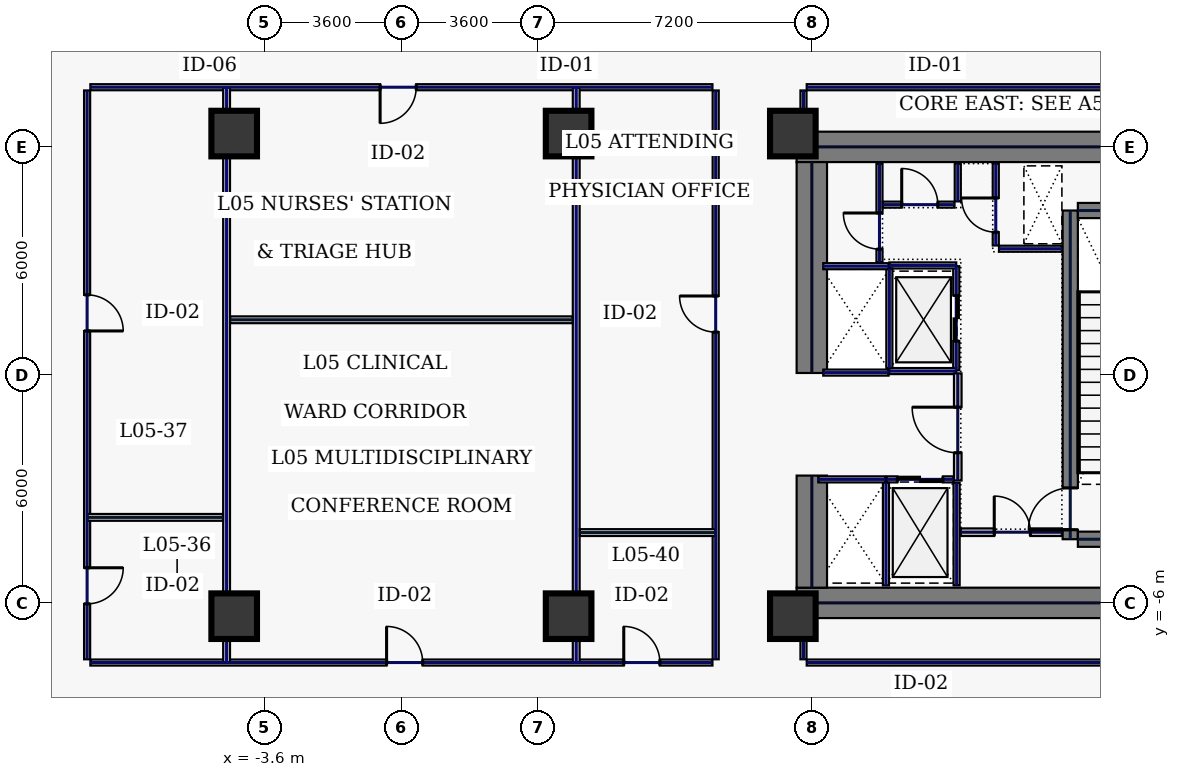
"""IFC4 building model, lengths in metres.
Left out: names, types, materials, properties, quantities, classifications, styles, units other than length and angle.
Written with IfcOpenShell. Run it as: python <this file> out.ifc"""

import sys

from ifc_helpers import new_model, si_unit, direction, frame, frame_2d, origin, origin_2d, place, context, subcontext, project, spatial, rectangle, hollow_rectangle, extrude, element, fill, save


model = new_model("IFC4")
c1 = context("Model", 3, precision=1e-05, world=origin(), true_north=direction((0.0, 1.0)))
c2 = subcontext(c1, "Body", "Model", "MODEL_VIEW")
j1 = project(units=[si_unit("LENGTHUNIT", "METRE"), si_unit("PLANEANGLEUNIT", "RADIAN")], contexts=[c1])
p1 = place(None, origin())
s1 = spatial("IfcSite", under=j1, at=p1, CompositionType="ELEMENT")
p2 = place(p1, origin())
s2 = spatial("IfcBuilding", under=s1, at=p2, CompositionType="ELEMENT")
p3 = place(p2, frame((0.0, 0.0, 28.4)))
s3 = spatial("IfcBuildingStorey", under=s2, at=p3, CompositionType="ELEMENT", Elevation=28.4)
for number, where, z_axis, x_axis in (
    (1, (10.4, 6.0, 0.0), (0.0, 0.0, 1.0), (1.0, 0.0, 0.0)),
    (2, (10.4, -6.0, 0.0), (0.0, 0.0, 1.0), (1.0, 0.0, 0.0)),
):
    element("IfcWall", number, at=place(p3, frame(where, z_axis=z_axis, x_axis=x_axis)), inside=s3, PredefinedType="SHEAR", context=c2, shape_type="SweptSolid", body=[
        extrude(rectangle(XDim=11.6, YDim=0.8, at=frame_2d((5.8, 0.0))), origin(), (0.0, 0.0, 1.0), 4.68),
    ])
p4 = place(p3, frame((10.8, -5.6, 0.0), z_axis=(0.0, 0.0, 1.0), x_axis=(0.0, 1.0, 0.0)))
e3 = element("IfcWall", 3, at=p4, inside=s3, PredefinedType="SHEAR", context=c2, shape_type="SweptSolid", body=[
    extrude(rectangle(XDim=2.95, YDim=0.8, at=frame_2d((1.475, 0.0))), origin(), (0.0, 0.0, 1.0), 4.68),
])
p5 = place(p3, frame((10.8, 0.05, 0.0), z_axis=(0.0, 0.0, 1.0), x_axis=(0.0, 1.0, 0.0)))
e4 = element("IfcWall", 4, at=p5, inside=s3, PredefinedType="SHEAR", context=c2, shape_type="SweptSolid", body=[
    extrude(rectangle(XDim=5.55, YDim=0.8, at=frame_2d((2.775, 0.0))), origin(), (0.0, 0.0, 1.0), 4.68),
])
p6 = place(p3, frame((17.6, -4.325, 0.0), z_axis=(0.0, 0.0, 1.0), x_axis=(0.0, 1.0, 0.0)))
e5 = element("IfcWall", 5, at=p6, inside=s3, PredefinedType="SHEAR", context=c2, shape_type="SweptSolid", body=[
    extrude(rectangle(XDim=8.65, YDim=0.4, at=frame_2d((4.325, 0.0))), origin(), (0.0, 0.0, 1.0), 4.68),
])
p7 = place(p6, frame((0.25, 0.0, 0.0)))
e6 = element("IfcOpeningElement", 6, at=p7, cuts=e5, PredefinedType="OPENING", context=c2, shape_type="SweptSolid", body=[
    extrude(rectangle(XDim=1.1, YDim=2.2, at=frame_2d((0.55, 1.1))), frame((0.0, 0.21, 0.0), z_axis=(0.0, -1.0, 0.0), x_axis=(1.0, 0.0, 0.0)), (0.0, 0.0, 1.0), 0.42),
])
for number, where, z_axis, x_axis in (
    (7, (17.8, -4.325, 0.0), (0.0, 0.0, 1.0), (1.0, 0.0, 0.0)),
    (8, (17.8, 4.325, 0.0), (0.0, 0.0, 1.0), (1.0, 0.0, 0.0)),
):
    element("IfcWall", number, at=place(p3, frame(where, z_axis=z_axis, x_axis=x_axis)), inside=s3, PredefinedType="SHEAR", context=c2, shape_type="SweptSolid", body=[
        extrude(rectangle(XDim=3.4, YDim=0.4, at=frame_2d((1.7, 0.0))), origin(), (0.0, 0.0, 1.0), 4.68),
    ])
for number, where, z_axis, x_axis in (
    (9, (10.3, -6.35, 0.0), (0.0, 0.0, 1.0), (1.0, 0.0, 0.0)),
    (10, (10.3, 6.35, 0.0), (0.0, 0.0, 1.0), (1.0, 0.0, 0.0)),
    (11, (-4.4, -6.35, 0.0), (0.0, 0.0, 1.0), (1.0, 0.0, 0.0)),
    (12, (4.4, -6.35, 0.0), (0.0, 0.0, 1.0), (1.0, 0.0, 0.0)),
    (13, (-4.4, 6.35, 0.0), (0.0, 0.0, 1.0), (1.0, 0.0, 0.0)),
    (14, (4.4, 6.35, 0.0), (0.0, 0.0, 1.0), (1.0, 0.0, 0.0)),
):
    element("IfcColumn", number, at=place(p3, frame(where, z_axis=z_axis, x_axis=x_axis)), inside=s3, PredefinedType="COLUMN", context=c2, shape_type="SweptSolid", body=[
        extrude(hollow_rectangle(XDim=1.2, YDim=1.2, WallThickness=0.05, at=origin_2d()), origin(), (0.0, 0.0, 1.0), 4.68),
    ])
p8 = place(p3, frame((14.6, 0.12, 0.0), z_axis=(0.0, 0.0, 1.0), x_axis=(0.0, 1.0, 0.0)))
e15 = element("IfcWall", 15, at=p8, inside=s3, PredefinedType="PARTITIONING", context=c2, shape_type="SweptSolid", body=[
    extrude(rectangle(XDim=2.74, YDim=0.16, at=frame_2d((1.37, 0.0))), origin(), (0.0, 0.0, 1.0), 4.68),
])
p9 = place(p8, frame((0.77, 0.0, 0.0)))
e16 = element("IfcOpeningElement", 16, at=p9, cuts=e15, PredefinedType="OPENING", context=c2, shape_type="SweptSolid", body=[
    extrude(rectangle(XDim=1.2, YDim=2.2, at=frame_2d((0.6, 1.1))), frame((0.0, 0.09, 0.0), z_axis=(0.0, -1.0, 0.0), x_axis=(1.0, 0.0, 0.0)), (0.0, 0.0, 1.0), 0.18),
])
for number, where, z_axis, x_axis in (
    (17, (12.84, 0.1, 0.0), (0.0, 0.0, 1.0), (1.0, 0.0, 0.0)),
    (18, (12.84, 2.88, 0.0), (0.0, 0.0, 1.0), (1.0, 0.0, 0.0)),
):
    element("IfcWall", number, at=place(p3, frame(where, z_axis=z_axis, x_axis=x_axis)), inside=s3, PredefinedType="PARTITIONING", context=c2, shape_type="SweptSolid", body=[
        extrude(rectangle(XDim=1.76, YDim=0.16, at=frame_2d((0.88, 0.0))), origin(), (0.0, 0.0, 1.0), 4.68),
    ])
p10 = place(p3, frame((12.84, 0.18, 0.0), z_axis=(0.0, 0.0, 1.0), x_axis=(0.0, 1.0, 0.0)))
e19 = element("IfcWall", 19, at=p10, inside=s3, PredefinedType="PARTITIONING", context=c2, shape_type="SweptSolid", body=[
    extrude(rectangle(XDim=2.62, YDim=0.16, at=frame_2d((1.31, 0.0))), origin(), (0.0, 0.0, 1.0), 4.68),
])
p11 = place(p3, frame((12.77, -2.75, 0.0), z_axis=(0.0, 0.0, 1.0), x_axis=(1.0, 0.0, 0.0)))
e20 = element("IfcWall", 20, at=p11, inside=s3, PredefinedType="PARTITIONING", context=c2, shape_type="SweptSolid", body=[
    extrude(rectangle(XDim=1.76, YDim=0.16, at=frame_2d((0.88, 0.0))), origin(), (0.0, 0.0, 1.0), 4.68),
])
p12 = place(p11, frame((0.28, 0.0, 0.0)))
e21 = element("IfcOpeningElement", 21, at=p12, cuts=e20, PredefinedType="OPENING", context=c2, shape_type="SweptSolid", body=[
    extrude(rectangle(XDim=1.2, YDim=2.2, at=frame_2d((0.6, 1.1))), frame((0.0, 0.09, 0.0), z_axis=(0.0, -1.0, 0.0), x_axis=(1.0, 0.0, 0.0)), (0.0, 0.0, 1.0), 0.18),
])
for number, where, z_axis, x_axis in (
    (22, (12.75, -5.54, 0.0), (0.0, 0.0, 1.0), (0.0, 1.0, 0.0)),
    (23, (14.61, -5.54, 0.0), (0.0, 0.0, 1.0), (0.0, 1.0, 0.0)),
):
    element("IfcWall", number, at=place(p3, frame(where, z_axis=z_axis, x_axis=x_axis)), inside=s3, PredefinedType="PARTITIONING", context=c2, shape_type="SweptSolid", body=[
        extrude(rectangle(XDim=2.7, YDim=0.16, at=frame_2d((1.35, 0.0))), origin(), (0.0, 0.0, 1.0), 4.68),
    ])
p13 = place(p3, frame((10.97, -2.75, 0.0), z_axis=(0.0, 0.0, 1.0), x_axis=(1.0, 0.0, 0.0)))
e24 = element("IfcWall", 24, at=p13, inside=s3, PredefinedType="PARTITIONING", context=c2, shape_type="SweptSolid", body=[
    extrude(rectangle(XDim=1.76, YDim=0.16, at=frame_2d((0.88, 0.0))), origin(), (0.0, 0.0, 1.0), 4.68),
])
for number, where, z_axis, x_axis in (
    (25, (11.1, 0.06, 0.0), (0.0, 0.0, 1.0), (1.0, 0.0, 0.0)),
    (26, (11.1, 2.86, 0.0), (0.0, 0.0, 1.0), (1.0, 0.0, 0.0)),
):
    element("IfcWall", number, at=place(p3, frame(where, z_axis=z_axis, x_axis=x_axis)), inside=s3, PredefinedType="PARTITIONING", context=c2, shape_type="SweptSolid", body=[
        extrude(rectangle(XDim=1.72, YDim=0.16, at=frame_2d((0.86, 0.0))), origin(), (0.0, 0.0, 1.0), 4.68),
    ])
p14 = place(p3, frame((15.64, 3.405, 0.0), z_axis=(0.0, 0.0, 1.0), x_axis=(0.0, 1.0, 0.0)))
e27 = element("IfcWall", 27, at=p14, inside=s3, PredefinedType="PARTITIONING", context=c2, shape_type="SweptSolid", body=[
    extrude(rectangle(XDim=2.155, YDim=0.16, at=frame_2d((1.078, 0.0))), origin(), (0.0, 0.0, 1.0), 4.68),
])
p15 = place(p14, frame((0.35, 0.0, 0.0)))
e28 = element("IfcOpeningElement", 28, at=p15, cuts=e27, PredefinedType="OPENING", context=c2, shape_type="SweptSolid", body=[
    extrude(rectangle(XDim=0.9, YDim=2.2, at=frame_2d((0.45, 1.1))), frame((0.0, 0.09, 0.0), z_axis=(0.0, -1.0, 0.0), x_axis=(1.0, 0.0, 0.0)), (0.0, 0.0, 1.0), 0.18),
])
p16 = place(p3, frame((15.725, 3.32, 0.0), z_axis=(0.0, 0.0, 1.0), x_axis=(1.0, 0.0, 0.0)))
e29 = element("IfcWall", 29, at=p16, inside=s3, PredefinedType="PARTITIONING", context=c2, shape_type="SweptSolid", body=[
    extrude(rectangle(XDim=1.655, YDim=0.16, at=frame_2d((0.827, 0.0))), origin(), (0.0, 0.0, 1.0), 4.68),
])
p17 = place(p3, frame((14.72, -4.14, 0.0), z_axis=(0.0, 0.0, 1.0), x_axis=(1.0, 0.0, 0.0)))
e30 = element("IfcWall", 30, at=p17, inside=s3, PredefinedType="SOLIDWALL", context=c2, shape_type="SweptSolid", body=[
    extrude(rectangle(XDim=2.66, YDim=0.2, at=frame_2d((1.33, 0.0))), origin(), (0.0, 0.0, 1.0), 4.68),
])
p18 = place(p17, frame((0.88, 0.0, 0.0)))
e31 = element("IfcOpeningElement", 31, at=p18, cuts=e30, PredefinedType="OPENING", context=c2, shape_type="SweptSolid", body=[
    extrude(rectangle(XDim=0.95, YDim=2.2, at=frame_2d((0.475, 1.1))), frame((0.0, 0.11, 0.0), z_axis=(0.0, -1.0, 0.0), x_axis=(1.0, 0.0, 0.0)), (0.0, 0.0, 1.0), 0.22),
])
p19 = place(p3, frame((12.58, 2.96, 0.0), z_axis=(0.0, 0.0, 1.0), x_axis=(0.0, 1.0, 0.0)))
e32 = element("IfcWall", 32, at=p19, inside=s3, PredefinedType="PARTITIONING", context=c2, shape_type="SweptSolid", body=[
    extrude(rectangle(XDim=2.6, YDim=0.16, at=frame_2d((1.3, 0.0))), origin(), (0.0, 0.0, 1.0), 4.68),
])
p20 = place(p19, frame((0.35, 0.0, 0.0)))
e33 = element("IfcOpeningElement", 33, at=p20, cuts=e32, PredefinedType="OPENING", context=c2, shape_type="SweptSolid", body=[
    extrude(rectangle(XDim=0.95, YDim=2.2, at=frame_2d((0.475, 1.1))), frame((0.0, 0.09, 0.0), z_axis=(0.0, -1.0, 0.0), x_axis=(1.0, 0.0, 0.0)), (0.0, 0.0, 1.0), 0.18),
])
p21 = place(p3, frame((12.665, 4.48, 0.0), z_axis=(0.0, 0.0, 1.0), x_axis=(1.0, 0.0, 0.0)))
e34 = element("IfcWall", 34, at=p21, inside=s3, PredefinedType="PARTITIONING", context=c2, shape_type="SweptSolid", body=[
    extrude(rectangle(XDim=1.89, YDim=0.16, at=frame_2d((0.945, 0.0))), origin(), (0.0, 0.0, 1.0), 4.68),
])
p22 = place(p21, frame((0.5, 0.0, 0.0)))
e35 = element("IfcOpeningElement", 35, at=p22, cuts=e34, PredefinedType="OPENING", context=c2, shape_type="SweptSolid", body=[
    extrude(rectangle(XDim=0.95, YDim=2.2, at=frame_2d((0.475, 1.1))), frame((0.0, 0.09, 0.0), z_axis=(0.0, -1.0, 0.0), x_axis=(1.0, 0.0, 0.0)), (0.0, 0.0, 1.0), 0.18),
])
p23 = place(p3, frame((14.64, 4.565, 0.0), z_axis=(0.0, 0.0, 1.0), x_axis=(0.0, 1.0, 0.0)))
e36 = element("IfcWall", 36, at=p23, inside=s3, PredefinedType="PARTITIONING", context=c2, shape_type="SweptSolid", body=[
    extrude(rectangle(XDim=0.995, YDim=0.16, at=frame_2d((0.498, 0.0))), origin(), (0.0, 0.0, 1.0), 4.68),
])
p24 = place(p3, frame((14.64, -2.78, 0.0), z_axis=(0.0, 0.0, 1.0), x_axis=(0.0, 1.0, 0.0)))
e37 = element("IfcWall", 37, at=p24, inside=s3, PredefinedType="SOLIDWALL", context=c2, shape_type="SweptSolid", body=[
    extrude(rectangle(XDim=2.82, YDim=0.2, at=frame_2d((1.41, 0.0))), origin(), (0.0, 0.0, 1.0), 4.68),
])
p25 = place(p24, frame((0.73, 0.0, 0.0)))
e38 = element("IfcOpeningElement", 38, at=p25, cuts=e37, PredefinedType="OPENING", context=c2, shape_type="SweptSolid", body=[
    extrude(rectangle(XDim=1.2, YDim=2.2, at=frame_2d((0.6, 1.1))), frame((0.0, 0.11, 0.0), z_axis=(0.0, -1.0, 0.0), x_axis=(1.0, 0.0, 0.0)), (0.0, 0.0, 1.0), 0.22),
])
p26 = place(p3, frame((27.185, 7.57, 0.0), z_axis=(0.0, 0.0, 1.0), x_axis=(-1.0, 0.0, 0.0)))
e39 = element("IfcWall", 39, at=p26, inside=s3, PredefinedType="PARTITIONING", context=c2, shape_type="SweptSolid", body=[
    extrude(rectangle(XDim=16.52, YDim=0.16, at=frame_2d((8.26, 0.0))), origin(), (0.0, 0.0, 1.0), 4.68),
])
for number, where, z_axis, x_axis in (
    (40, (10.58, 7.485, 0.0), (0.0, 0.0, 1.0), (0.0, -1.0, 0.0)),
    (41, (10.58, -6.42, 0.0), (0.0, 0.0, 1.0), (0.0, -1.0, 0.0)),
):
    element("IfcWall", number, at=place(p3, frame(where, z_axis=z_axis, x_axis=x_axis)), inside=s3, PredefinedType="PARTITIONING", context=c2, shape_type="SweptSolid", body=[
        extrude(rectangle(XDim=1.065, YDim=0.16, at=frame_2d((0.533, 0.0))), origin(), (0.0, 0.0, 1.0), 4.68),
    ])
p27 = place(p3, frame((10.665, -7.57, 0.0), z_axis=(0.0, 0.0, 1.0), x_axis=(1.0, 0.0, 0.0)))
e42 = element("IfcWall", 42, at=p27, inside=s3, PredefinedType="PARTITIONING", context=c2, shape_type="SweptSolid", body=[
    extrude(rectangle(XDim=16.52, YDim=0.16, at=frame_2d((8.26, 0.0))), origin(), (0.0, 0.0, 1.0), 4.68),
])
p28 = place(p3, frame((8.185, 7.57, 0.0), z_axis=(0.0, 0.0, 1.0), x_axis=(-1.0, 0.0, 0.0)))
e43 = element("IfcWall", 43, at=p28, inside=s3, PredefinedType="PARTITIONING", context=c2, shape_type="SweptSolid", body=[
    extrude(rectangle(XDim=16.37, YDim=0.16, at=frame_2d((8.185, 0.0))), origin(), (0.0, 0.0, 1.0), 4.68),
])
p29 = place(p28, frame((7.795, 0.0, 0.0)))
e44 = element("IfcOpeningElement", 44, at=p29, cuts=e43, PredefinedType="OPENING", context=c2, shape_type="SweptSolid", body=[
    extrude(rectangle(XDim=0.95, YDim=2.2, at=frame_2d((0.475, 1.1))), frame((0.0, 0.09, 0.0), z_axis=(0.0, -1.0, 0.0), x_axis=(1.0, 0.0, 0.0)), (0.0, 0.0, 1.0), 0.18),
])
p30 = place(p3, frame((-8.27, 7.485, 0.0), z_axis=(0.0, 0.0, 1.0), x_axis=(0.0, -1.0, 0.0)))
e45 = element("IfcWall", 45, at=p30, inside=s3, PredefinedType="PARTITIONING", context=c2, shape_type="SweptSolid", body=[
    extrude(rectangle(XDim=14.97, YDim=0.16, at=frame_2d((7.485, 0.0))), origin(), (0.0, 0.0, 1.0), 4.68),
])
p31 = place(p30, frame((12.561, 0.0, 0.0)))
e46 = element("IfcOpeningElement", 46, at=p31, cuts=e45, PredefinedType="OPENING", context=c2, shape_type="SweptSolid", body=[
    extrude(rectangle(XDim=0.95, YDim=2.2, at=frame_2d((0.475, 1.1))), frame((0.0, 0.09, 0.0), z_axis=(0.0, -1.0, 0.0), x_axis=(1.0, 0.0, 0.0)), (0.0, 0.0, 1.0), 0.18),
])
p32 = place(p30, frame((5.379, 0.0, 0.0)))
e47 = element("IfcOpeningElement", 47, at=p32, cuts=e45, PredefinedType="OPENING", context=c2, shape_type="SweptSolid", body=[
    extrude(rectangle(XDim=0.95, YDim=2.2, at=frame_2d((0.475, 1.1))), frame((0.0, 0.09, 0.0), z_axis=(0.0, -1.0, 0.0), x_axis=(1.0, 0.0, 0.0)), (0.0, 0.0, 1.0), 0.18),
])
p33 = place(p3, frame((-8.185, -7.57, 0.0), z_axis=(0.0, 0.0, 1.0), x_axis=(1.0, 0.0, 0.0)))
e48 = element("IfcWall", 48, at=p33, inside=s3, PredefinedType="PARTITIONING", context=c2, shape_type="SweptSolid", body=[
    extrude(rectangle(XDim=16.37, YDim=0.16, at=frame_2d((8.185, 0.0))), origin(), (0.0, 0.0, 1.0), 4.68),
])
p34 = place(p33, frame((7.795, 0.0, 0.0)))
e49 = element("IfcOpeningElement", 49, at=p34, cuts=e48, PredefinedType="OPENING", context=c2, shape_type="SweptSolid", body=[
    extrude(rectangle(XDim=0.95, YDim=2.2, at=frame_2d((0.475, 1.1))), frame((0.0, 0.09, 0.0), z_axis=(0.0, -1.0, 0.0), x_axis=(1.0, 0.0, 0.0)), (0.0, 0.0, 1.0), 0.18),
])
p35 = place(p33, frame((14.036, 0.0, 0.0)))
e50 = element("IfcOpeningElement", 50, at=p35, cuts=e48, PredefinedType="OPENING", context=c2, shape_type="SweptSolid", body=[
    extrude(rectangle(XDim=0.95, YDim=2.2, at=frame_2d((0.475, 1.1))), frame((0.0, 0.09, 0.0), z_axis=(0.0, -1.0, 0.0), x_axis=(1.0, 0.0, 0.0)), (0.0, 0.0, 1.0), 0.18),
])
p36 = place(p3, frame((8.27, -7.485, 0.0), z_axis=(0.0, 0.0, 1.0), x_axis=(0.0, 1.0, 0.0)))
e51 = element("IfcWall", 51, at=p36, inside=s3, PredefinedType="PARTITIONING", context=c2, shape_type="SweptSolid", body=[
    extrude(rectangle(XDim=14.97, YDim=0.16, at=frame_2d((7.485, 0.0))), origin(), (0.0, 0.0, 1.0), 4.68),
])
p37 = place(p36, frame((8.611, 0.0, 0.0)))
e52 = element("IfcOpeningElement", 52, at=p37, cuts=e51, PredefinedType="OPENING", context=c2, shape_type="SweptSolid", body=[
    extrude(rectangle(XDim=0.95, YDim=2.2, at=frame_2d((0.475, 1.1))), frame((0.0, 0.09, 0.0), z_axis=(0.0, -1.0, 0.0), x_axis=(1.0, 0.0, 0.0)), (0.0, 0.0, 1.0), 0.18),
])
for number, where, z_axis, x_axis in (
    (53, (-4.6, -7.565, 0.0), (0.0, 0.0, 1.0), (0.0, 1.0, 0.0)),
    (54, (4.6, -7.565, 0.0), (0.0, 0.0, 1.0), (0.0, 1.0, 0.0)),
):
    element("IfcWall", number, at=place(p3, frame(where, z_axis=z_axis, x_axis=x_axis)), inside=s3, PredefinedType="PARTITIONING", context=c2, shape_type="SweptSolid", body=[
        extrude(rectangle(XDim=15.13, YDim=0.18, at=frame_2d((7.565, 0.0))), origin(), (0.0, 0.0, 1.0), 3.875),
    ])
p38 = place(p3, frame((-4.505, 1.45, 0.0), z_axis=(0.0, 0.0, 1.0), x_axis=(1.0, 0.0, 0.0)))
e55 = element("IfcWall", 55, at=p38, inside=s3, PredefinedType="PARTITIONING", context=c2, shape_type="SweptSolid", body=[
    extrude(rectangle(XDim=9.01, YDim=0.18, at=frame_2d((4.505, 0.0))), origin(), (0.0, 0.0, 1.0), 4.68),
])
for number, where, z_axis, x_axis in (
    (56, (-8.265, -3.75, 0.0), (0.0, 0.0, 1.0), (1.0, 0.0, 0.0)),
    (57, (4.695, -4.15, 0.0), (0.0, 0.0, 1.0), (1.0, 0.0, 0.0)),
):
    element("IfcWall", number, at=place(p3, frame(where, z_axis=z_axis, x_axis=x_axis)), inside=s3, PredefinedType="PARTITIONING", context=c2, shape_type="SweptSolid", body=[
        extrude(rectangle(XDim=3.57, YDim=0.18, at=frame_2d((1.785, 0.0))), origin(), (0.0, 0.0, 1.0), 4.68),
    ])
p39 = place(p7, origin())
e58 = element("IfcDoor", 58, at=p39, inside=s3, OperationType="SINGLE_SWING_LEFT", PredefinedType="DOOR", context=c2, shape_type="SweptSolid", body=[
    extrude(rectangle(XDim=1.1, YDim=2.2, at=frame_2d((0.55, 1.1))), frame((0.0, 0.025, 0.0), z_axis=(0.0, -1.0, 0.0), x_axis=(1.0, 0.0, 0.0)), (0.0, 0.0, 1.0), 0.05),
])
fill(e6, e58)
p40 = place(p9, origin())
e59 = element("IfcDoor", 59, at=p40, inside=s3, OperationType="SLIDING_TO_LEFT", PredefinedType="DOOR", context=c2, shape_type="SweptSolid", body=[
    extrude(rectangle(XDim=1.2, YDim=2.2, at=frame_2d((0.6, 1.1))), frame((0.0, 0.025, 0.0), z_axis=(0.0, -1.0, 0.0), x_axis=(1.0, 0.0, 0.0)), (0.0, 0.0, 1.0), 0.05),
])
fill(e16, e59)
p41 = place(p12, origin())
e60 = element("IfcDoor", 60, at=p41, inside=s3, OperationType="SLIDING_TO_LEFT", PredefinedType="DOOR", context=c2, shape_type="SweptSolid", body=[
    extrude(rectangle(XDim=1.2, YDim=2.2, at=frame_2d((0.6, 1.1))), frame((0.0, 0.025, 0.0), z_axis=(0.0, -1.0, 0.0), x_axis=(1.0, 0.0, 0.0)), (0.0, 0.0, 1.0), 0.05),
])
fill(e21, e60)
p42 = place(p15, origin())
e61 = element("IfcDoor", 61, at=p42, inside=s3, OperationType="SINGLE_SWING_RIGHT", PredefinedType="DOOR", context=c2, shape_type="SweptSolid", body=[
    extrude(rectangle(XDim=0.9, YDim=2.2, at=frame_2d((0.45, 1.1))), frame((0.0, 0.025, 0.0), z_axis=(0.0, -1.0, 0.0), x_axis=(1.0, 0.0, 0.0)), (0.0, 0.0, 1.0), 0.05),
])
fill(e28, e61)
p43 = place(p18, origin())
e62 = element("IfcDoor", 62, at=p43, inside=s3, OperationType="SINGLE_SWING_LEFT", PredefinedType="DOOR", context=c2, shape_type="SweptSolid", body=[
    extrude(rectangle(XDim=0.95, YDim=2.2, at=frame_2d((0.475, 1.1))), frame((0.0, 0.025, 0.0), z_axis=(0.0, -1.0, 0.0), x_axis=(1.0, 0.0, 0.0)), (0.0, 0.0, 1.0), 0.05),
])
fill(e31, e62)
p44 = place(p20, origin())
e63 = element("IfcDoor", 63, at=p44, inside=s3, OperationType="SINGLE_SWING_RIGHT", PredefinedType="DOOR", context=c2, shape_type="SweptSolid", body=[
    extrude(rectangle(XDim=0.95, YDim=2.2, at=frame_2d((0.475, 1.1))), frame((0.0, 0.025, 0.0), z_axis=(0.0, -1.0, 0.0), x_axis=(1.0, 0.0, 0.0)), (0.0, 0.0, 1.0), 0.05),
])
fill(e33, e63)
p45 = place(p22, origin())
e64 = element("IfcDoor", 64, at=p45, inside=s3, OperationType="SINGLE_SWING_LEFT", PredefinedType="DOOR", context=c2, shape_type="SweptSolid", body=[
    extrude(rectangle(XDim=0.95, YDim=2.2, at=frame_2d((0.475, 1.1))), frame((0.0, 0.025, 0.0), z_axis=(0.0, -1.0, 0.0), x_axis=(1.0, 0.0, 0.0)), (0.0, 0.0, 1.0), 0.05),
])
fill(e35, e64)
p46 = place(p25, origin())
e65 = element("IfcDoor", 65, at=p46, inside=s3, OperationType="SINGLE_SWING_RIGHT", PredefinedType="DOOR", context=c2, shape_type="SweptSolid", body=[
    extrude(rectangle(XDim=1.2, YDim=2.2, at=frame_2d((0.6, 1.1))), frame((0.0, 0.025, 0.0), z_axis=(0.0, -1.0, 0.0), x_axis=(1.0, 0.0, 0.0)), (0.0, 0.0, 1.0), 0.05),
])
fill(e38, e65)
p47 = place(p31, origin())
e66 = element("IfcDoor", 66, at=p47, inside=s3, OperationType="SINGLE_SWING_LEFT", PredefinedType="DOOR", context=c2, shape_type="SweptSolid", body=[
    extrude(rectangle(XDim=0.95, YDim=2.2, at=frame_2d((0.475, 1.1))), frame((0.0, 0.025, 0.0), z_axis=(0.0, -1.0, 0.0), x_axis=(1.0, 0.0, 0.0)), (0.0, 0.0, 1.0), 0.05),
])
fill(e46, e66)
p48 = place(p32, origin())
e67 = element("IfcDoor", 67, at=p48, inside=s3, OperationType="SINGLE_SWING_RIGHT", PredefinedType="DOOR", context=c2, shape_type="SweptSolid", body=[
    extrude(rectangle(XDim=0.95, YDim=2.2, at=frame_2d((0.475, 1.1))), frame((0.0, 0.025, 0.0), z_axis=(0.0, -1.0, 0.0), x_axis=(1.0, 0.0, 0.0)), (0.0, 0.0, 1.0), 0.05),
])
fill(e47, e67)
p49 = place(p34, origin())
e68 = element("IfcDoor", 68, at=p49, inside=s3, OperationType="SINGLE_SWING_LEFT", PredefinedType="DOOR", context=c2, shape_type="SweptSolid", body=[
    extrude(rectangle(XDim=0.95, YDim=2.2, at=frame_2d((0.475, 1.1))), frame((0.0, 0.025, 0.0), z_axis=(0.0, -1.0, 0.0), x_axis=(1.0, 0.0, 0.0)), (0.0, 0.0, 1.0), 0.05),
])
fill(e49, e68)
p50 = place(p29, origin())
e69 = element("IfcDoor", 69, at=p50, inside=s3, OperationType="SINGLE_SWING_RIGHT", PredefinedType="DOOR", context=c2, shape_type="SweptSolid", body=[
    extrude(rectangle(XDim=0.95, YDim=2.2, at=frame_2d((0.475, 1.1))), frame((0.0, 0.025, 0.0), z_axis=(0.0, -1.0, 0.0), x_axis=(1.0, 0.0, 0.0)), (0.0, 0.0, 1.0), 0.05),
])
fill(e44, e69)
p51 = place(p35, origin())
e70 = element("IfcDoor", 70, at=p51, inside=s3, OperationType="SINGLE_SWING_LEFT", PredefinedType="DOOR", context=c2, shape_type="SweptSolid", body=[
    extrude(rectangle(XDim=0.95, YDim=2.2, at=frame_2d((0.475, 1.1))), frame((0.0, 0.025, 0.0), z_axis=(0.0, -1.0, 0.0), x_axis=(1.0, 0.0, 0.0)), (0.0, 0.0, 1.0), 0.05),
])
fill(e50, e70)
p52 = place(p37, origin())
e71 = element("IfcDoor", 71, at=p52, inside=s3, OperationType="SINGLE_SWING_RIGHT", PredefinedType="DOOR", context=c2, shape_type="SweptSolid", body=[
    extrude(rectangle(XDim=0.95, YDim=2.2, at=frame_2d((0.475, 1.1))), frame((0.0, 0.025, 0.0), z_axis=(0.0, -1.0, 0.0), x_axis=(1.0, 0.0, 0.0)), (0.0, 0.0, 1.0), 0.05),
])
fill(e52, e71)
save(model, sys.argv[1])
